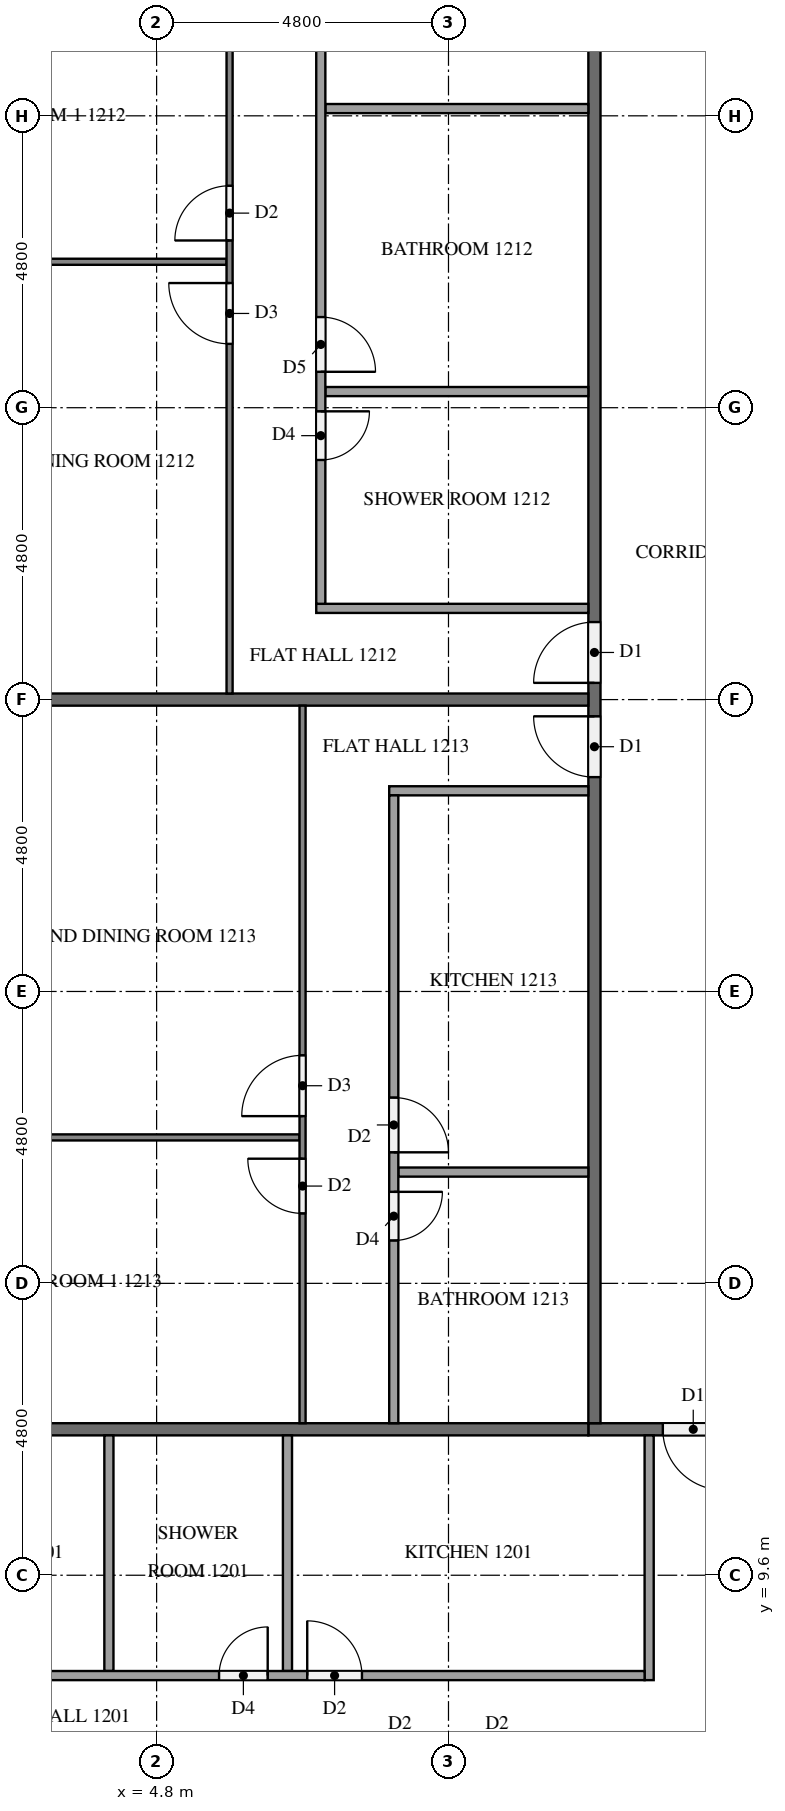
"""IFC4 building model, lengths in metres.
Left out: names, types, materials, properties, quantities, classifications, styles, units other than length and angle.
Written with IfcOpenShell. Run it as: python <this file> out.ifc"""

import sys

from ifc_helpers import new_model, si_unit, direction, frame, frame_2d, origin, place, context, subcontext, project, spatial, rectangle, extrude, element, fill, save


model = new_model("IFC4")
c1 = context("Model", 3, precision=1e-05, world=origin(), true_north=direction((0.0, 1.0)))
c2 = subcontext(c1, "Body", "Model", "MODEL_VIEW")
j1 = project(units=[si_unit("LENGTHUNIT", "METRE"), si_unit("PLANEANGLEUNIT", "RADIAN")], contexts=[c1])
p1 = place(None, origin())
s1 = spatial("IfcSite", under=j1, at=p1, CompositionType="ELEMENT")
p2 = place(p1, origin())
s2 = spatial("IfcBuilding", under=s1, at=p2, CompositionType="ELEMENT")
p3 = place(p2, frame((0.0, 0.0, 50.4)))
s3 = spatial("IfcBuildingStorey", under=s2, at=p3, CompositionType="ELEMENT", Elevation=50.4)
p4 = place(p3, frame((50.5, 12.0, 0.0), z_axis=(0.0, 0.0, 1.0), x_axis=(-1.0, 0.0, 0.0)))
e1 = element("IfcWall", 1, at=p4, inside=s3, PredefinedType="PARTITIONING", context=c2, shape_type="SweptSolid", body=[
    extrude(rectangle(XDim=38.6, YDim=0.2, at=frame_2d((19.3, 0.0))), origin(), (0.0, 0.0, 1.0), 3.1),
])
p5 = place(p4, frame((36.375, 0.0, 0.0)))
e2 = element("IfcOpeningElement", 2, at=p5, cuts=e1, PredefinedType="OPENING", context=c2, shape_type="SweptSolid", body=[
    extrude(rectangle(XDim=1.0, YDim=2.1, at=frame_2d((0.5, 1.05))), frame((0.0, 0.11, 0.0), z_axis=(0.0, -1.0, 0.0), x_axis=(1.0, 0.0, 0.0)), (0.0, 0.0, 1.0), 0.22),
])
p6 = place(p4, frame((19.575, 0.0, 0.0)))
e3 = element("IfcOpeningElement", 3, at=p6, cuts=e1, PredefinedType="OPENING", context=c2, shape_type="SweptSolid", body=[
    extrude(rectangle(XDim=1.0, YDim=2.1, at=frame_2d((0.5, 1.05))), frame((0.0, 0.11, 0.0), z_axis=(0.0, -1.0, 0.0), x_axis=(1.0, 0.0, 0.0)), (0.0, 0.0, 1.0), 0.22),
])
p7 = place(p4, frame((7.575, 0.0, 0.0)))
e4 = element("IfcOpeningElement", 4, at=p7, cuts=e1, PredefinedType="OPENING", context=c2, shape_type="SweptSolid", body=[
    extrude(rectangle(XDim=1.0, YDim=2.1, at=frame_2d((0.5, 1.05))), frame((0.0, 0.11, 0.0), z_axis=(0.0, -1.0, 0.0), x_axis=(1.0, 0.0, 0.0)), (0.0, 0.0, 1.0), 0.22),
])
p8 = place(p4, frame((0.375, 0.0, 0.0)))
e5 = element("IfcOpeningElement", 5, at=p8, cuts=e1, PredefinedType="OPENING", context=c2, shape_type="SweptSolid", body=[
    extrude(rectangle(XDim=1.0, YDim=2.1, at=frame_2d((0.5, 1.05))), frame((0.0, 0.11, 0.0), z_axis=(0.0, -1.0, 0.0), x_axis=(1.0, 0.0, 0.0)), (0.0, 0.0, 1.0), 0.22),
])
p9 = place(p3, frame((12.0, 12.1, 0.0), z_axis=(0.0, 0.0, 1.0), x_axis=(0.0, 1.0, 0.0)))
e6 = element("IfcWall", 6, at=p9, inside=s3, PredefinedType="PARTITIONING", context=c2, shape_type="SweptSolid", body=[
    extrude(rectangle(XDim=28.6, YDim=0.2, at=frame_2d((14.3, 0.0))), origin(), (0.0, 0.0, 1.0), 3.1),
])
p10 = place(p9, frame((12.175, 0.0, 0.0)))
e7 = element("IfcOpeningElement", 7, at=p10, cuts=e6, PredefinedType="OPENING", context=c2, shape_type="SweptSolid", body=[
    extrude(rectangle(XDim=1.0, YDim=2.1, at=frame_2d((0.5, 1.05))), frame((0.0, 0.11, 0.0), z_axis=(0.0, -1.0, 0.0), x_axis=(1.0, 0.0, 0.0)), (0.0, 0.0, 1.0), 0.22),
])
p11 = place(p9, frame((10.625, 0.0, 0.0)))
e8 = element("IfcOpeningElement", 8, at=p11, cuts=e6, PredefinedType="OPENING", context=c2, shape_type="SweptSolid", body=[
    extrude(rectangle(XDim=1.0, YDim=2.1, at=frame_2d((0.5, 1.05))), frame((0.0, 0.11, 0.0), z_axis=(0.0, -1.0, 0.0), x_axis=(1.0, 0.0, 0.0)), (0.0, 0.0, 1.0), 0.22),
])
p12 = place(p3, frame((0.1, 12.0, 0.0), z_axis=(0.0, 0.0, 1.0), x_axis=(1.0, 0.0, 0.0)))
e9 = element("IfcWall", 9, at=p12, inside=s3, PredefinedType="PARTITIONING", context=c2, shape_type="SweptSolid", body=[
    extrude(rectangle(XDim=11.8, YDim=0.2, at=frame_2d((5.9, 0.0))), origin(), (0.0, 0.0, 1.0), 3.1),
])
p13 = place(p3, frame((0.45, 24.0, 0.0), z_axis=(0.0, 0.0, 1.0), x_axis=(1.0, 0.0, 0.0)))
e10 = element("IfcWall", 10, at=p13, inside=s3, PredefinedType="PARTITIONING", context=c2, shape_type="SweptSolid", body=[
    extrude(rectangle(XDim=11.45, YDim=0.2, at=frame_2d((5.725, 0.0))), origin(), (0.0, 0.0, 1.0), 3.1),
])
for number, where, z_axis, x_axis in (
    (11, (6.952, 11.9, 0.0), (0.0, 0.0, 1.0), (0.0, -1.0, 0.0)),
    (12, (4.015, 11.9, 0.0), (0.0, 0.0, 1.0), (0.0, -1.0, 0.0)),
):
    element("IfcWall", number, at=place(p3, frame(where, z_axis=z_axis, x_axis=x_axis)), inside=s3, PredefinedType="PARTITIONING", context=c2, shape_type="SweptSolid", body=[
        extrude(rectangle(XDim=3.875, YDim=0.15, at=frame_2d((1.938, 0.0))), origin(), (0.0, 0.0, 1.0), 3.1),
    ])
p14 = place(p3, frame((12.9, 11.9, 0.0), z_axis=(0.0, 0.0, 1.0), x_axis=(0.0, -1.0, 0.0)))
e13 = element("IfcWall", 13, at=p14, inside=s3, PredefinedType="PARTITIONING", context=c2, shape_type="SweptSolid", body=[
    extrude(rectangle(XDim=4.025, YDim=0.15, at=frame_2d((2.012, 0.0))), origin(), (0.0, 0.0, 1.0), 3.1),
])
p15 = place(p3, frame((0.1, 7.95, 0.0), z_axis=(0.0, 0.0, 1.0), x_axis=(1.0, 0.0, 0.0)))
e14 = element("IfcWall", 14, at=p15, inside=s3, PredefinedType="PARTITIONING", context=c2, shape_type="SweptSolid", body=[
    extrude(rectangle(XDim=12.725, YDim=0.15, at=frame_2d((6.362, 0.0))), origin(), (0.0, 0.0, 1.0), 3.1),
])
p16 = place(p15, frame((7.177, 0.0, 0.0)))
e15 = element("IfcOpeningElement", 15, at=p16, cuts=e14, PredefinedType="OPENING", context=c2, shape_type="SweptSolid", body=[
    extrude(rectangle(XDim=0.9, YDim=2.1, at=frame_2d((0.45, 1.05))), frame((0.0, 0.085, 0.0), z_axis=(0.0, -1.0, 0.0), x_axis=(1.0, 0.0, 0.0)), (0.0, 0.0, 1.0), 0.17),
])
p17 = place(p15, frame((5.727, 0.0, 0.0)))
e16 = element("IfcOpeningElement", 16, at=p17, cuts=e14, PredefinedType="OPENING", context=c2, shape_type="SweptSolid", body=[
    extrude(rectangle(XDim=0.8, YDim=2.1, at=frame_2d((0.4, 1.05))), frame((0.0, 0.085, 0.0), z_axis=(0.0, -1.0, 0.0), x_axis=(1.0, 0.0, 0.0)), (0.0, 0.0, 1.0), 0.17),
])
p18 = place(p15, frame((0.35, 0.0, 0.0)))
e17 = element("IfcOpeningElement", 17, at=p18, cuts=e14, PredefinedType="OPENING", context=c2, shape_type="SweptSolid", body=[
    extrude(rectangle(XDim=0.9, YDim=2.1, at=frame_2d((0.45, 1.05))), frame((0.0, 0.085, 0.0), z_axis=(0.0, -1.0, 0.0), x_axis=(1.0, 0.0, 0.0)), (0.0, 0.0, 1.0), 0.17),
])
p19 = place(p3, frame((5.95, 31.2, 0.0), z_axis=(0.0, 0.0, 1.0), x_axis=(-1.0, 0.0, 0.0)))
e18 = element("IfcWall", 18, at=p19, inside=s3, PredefinedType="PARTITIONING", context=c2, shape_type="SweptSolid", body=[
    extrude(rectangle(XDim=5.85, YDim=0.1, at=frame_2d((2.925, 0.0))), origin(), (0.0, 0.0, 1.0), 3.1),
])
p20 = place(p3, frame((6.0, 24.1, 0.0), z_axis=(0.0, 0.0, 1.0), x_axis=(0.0, 1.0, 0.0)))
e19 = element("IfcWall", 19, at=p20, inside=s3, PredefinedType="PARTITIONING", context=c2, shape_type="SweptSolid", body=[
    extrude(rectangle(XDim=16.6, YDim=0.1, at=frame_2d((8.3, 0.0))), origin(), (0.0, 0.0, 1.0), 3.1),
])
p21 = place(p20, frame((5.75, 0.0, 0.0)))
e20 = element("IfcOpeningElement", 20, at=p21, cuts=e19, PredefinedType="OPENING", context=c2, shape_type="SweptSolid", body=[
    extrude(rectangle(XDim=1.0, YDim=2.1, at=frame_2d((0.5, 1.05))), frame((0.0, 0.06, 0.0), z_axis=(0.0, -1.0, 0.0), x_axis=(1.0, 0.0, 0.0)), (0.0, 0.0, 1.0), 0.12),
])
p22 = place(p20, frame((7.45, 0.0, 0.0)))
e21 = element("IfcOpeningElement", 21, at=p22, cuts=e19, PredefinedType="OPENING", context=c2, shape_type="SweptSolid", body=[
    extrude(rectangle(XDim=0.9, YDim=2.1, at=frame_2d((0.45, 1.05))), frame((0.0, 0.06, 0.0), z_axis=(0.0, -1.0, 0.0), x_axis=(1.0, 0.0, 0.0)), (0.0, 0.0, 1.0), 0.12),
])
p23 = place(p20, frame((15.4, 0.0, 0.0)))
e22 = element("IfcOpeningElement", 22, at=p23, cuts=e19, PredefinedType="OPENING", context=c2, shape_type="SweptSolid", body=[
    extrude(rectangle(XDim=0.9, YDim=2.1, at=frame_2d((0.45, 1.05))), frame((0.0, 0.06, 0.0), z_axis=(0.0, -1.0, 0.0), x_axis=(1.0, 0.0, 0.0)), (0.0, 0.0, 1.0), 0.12),
])
for number, where, z_axis, x_axis in (
    (23, (11.9, 29.065, 0.0), (0.0, 0.0, 1.0), (-1.0, 0.0, 0.0)),
    (24, (11.9, 33.719, 0.0), (0.0, 0.0, 1.0), (-1.0, 0.0, 0.0)),
):
    element("IfcWall", number, at=place(p3, frame(where, z_axis=z_axis, x_axis=x_axis)), inside=s3, PredefinedType="PARTITIONING", context=c2, shape_type="SweptSolid", body=[
        extrude(rectangle(XDim=4.325, YDim=0.15, at=frame_2d((2.163, 0.0))), origin(), (0.0, 0.0, 1.0), 3.1),
    ])
p24 = place(p3, frame((11.9, 25.5, 0.0), z_axis=(0.0, 0.0, 1.0), x_axis=(-1.0, 0.0, 0.0)))
e25 = element("IfcWall", 25, at=p24, inside=s3, PredefinedType="PARTITIONING", context=c2, shape_type="SweptSolid", body=[
    extrude(rectangle(XDim=4.475, YDim=0.15, at=frame_2d((2.237, 0.0))), origin(), (0.0, 0.0, 1.0), 3.1),
])
p25 = place(p3, frame((7.5, 40.7, 0.0), z_axis=(0.0, 0.0, 1.0), x_axis=(0.0, -1.0, 0.0)))
e26 = element("IfcWall", 26, at=p25, inside=s3, PredefinedType="PARTITIONING", context=c2, shape_type="SweptSolid", body=[
    extrude(rectangle(XDim=15.125, YDim=0.15, at=frame_2d((7.562, 0.0))), origin(), (0.0, 0.0, 1.0), 3.1),
])
p26 = place(p25, frame((11.96, 0.0, 0.0)))
e27 = element("IfcOpeningElement", 27, at=p26, cuts=e26, PredefinedType="OPENING", context=c2, shape_type="SweptSolid", body=[
    extrude(rectangle(XDim=0.8, YDim=2.1, at=frame_2d((0.4, 1.05))), frame((0.0, 0.085, 0.0), z_axis=(0.0, -1.0, 0.0), x_axis=(1.0, 0.0, 0.0)), (0.0, 0.0, 1.0), 0.17),
])
p27 = place(p25, frame((10.41, 0.0, 0.0)))
e28 = element("IfcOpeningElement", 28, at=p27, cuts=e26, PredefinedType="OPENING", context=c2, shape_type="SweptSolid", body=[
    extrude(rectangle(XDim=0.9, YDim=2.1, at=frame_2d((0.45, 1.05))), frame((0.0, 0.085, 0.0), z_axis=(0.0, -1.0, 0.0), x_axis=(1.0, 0.0, 0.0)), (0.0, 0.0, 1.0), 0.17),
])
p28 = place(p25, frame((0.35, 0.0, 0.0)))
e29 = element("IfcOpeningElement", 29, at=p28, cuts=e26, PredefinedType="OPENING", context=c2, shape_type="SweptSolid", body=[
    extrude(rectangle(XDim=0.9, YDim=2.1, at=frame_2d((0.45, 1.05))), frame((0.0, 0.085, 0.0), z_axis=(0.0, -1.0, 0.0), x_axis=(1.0, 0.0, 0.0)), (0.0, 0.0, 1.0), 0.17),
])
p29 = place(p3, frame((7.15, 16.8, 0.0), z_axis=(0.0, 0.0, 1.0), x_axis=(-1.0, 0.0, 0.0)))
e30 = element("IfcWall", 30, at=p29, inside=s3, PredefinedType="PARTITIONING", context=c2, shape_type="SweptSolid", body=[
    extrude(rectangle(XDim=7.05, YDim=0.1, at=frame_2d((3.525, 0.0))), origin(), (0.0, 0.0, 1.0), 3.1),
])
p30 = place(p3, frame((7.2, 12.1, 0.0), z_axis=(0.0, 0.0, 1.0), x_axis=(0.0, 1.0, 0.0)))
e31 = element("IfcWall", 31, at=p30, inside=s3, PredefinedType="PARTITIONING", context=c2, shape_type="SweptSolid", body=[
    extrude(rectangle(XDim=11.8, YDim=0.1, at=frame_2d((5.9, 0.0))), origin(), (0.0, 0.0, 1.0), 3.1),
])
p31 = place(p30, frame((5.05, 0.0, 0.0)))
e32 = element("IfcOpeningElement", 32, at=p31, cuts=e31, PredefinedType="OPENING", context=c2, shape_type="SweptSolid", body=[
    extrude(rectangle(XDim=1.0, YDim=2.1, at=frame_2d((0.5, 1.05))), frame((0.0, 0.06, 0.0), z_axis=(0.0, -1.0, 0.0), x_axis=(1.0, 0.0, 0.0)), (0.0, 0.0, 1.0), 0.12),
])
p32 = place(p30, frame((3.45, 0.0, 0.0)))
e33 = element("IfcOpeningElement", 33, at=p32, cuts=e31, PredefinedType="OPENING", context=c2, shape_type="SweptSolid", body=[
    extrude(rectangle(XDim=0.9, YDim=2.1, at=frame_2d((0.45, 1.05))), frame((0.0, 0.06, 0.0), z_axis=(0.0, -1.0, 0.0), x_axis=(1.0, 0.0, 0.0)), (0.0, 0.0, 1.0), 0.12),
])
p33 = place(p3, frame((11.9, 16.23, 0.0), z_axis=(0.0, 0.0, 1.0), x_axis=(-1.0, 0.0, 0.0)))
e34 = element("IfcWall", 34, at=p33, inside=s3, PredefinedType="PARTITIONING", context=c2, shape_type="SweptSolid", body=[
    extrude(rectangle(XDim=3.125, YDim=0.15, at=frame_2d((1.562, 0.0))), origin(), (0.0, 0.0, 1.0), 3.1),
])
p34 = place(p3, frame((11.9, 22.5, 0.0), z_axis=(0.0, 0.0, 1.0), x_axis=(-1.0, 0.0, 0.0)))
e35 = element("IfcWall", 35, at=p34, inside=s3, PredefinedType="PARTITIONING", context=c2, shape_type="SweptSolid", body=[
    extrude(rectangle(XDim=3.275, YDim=0.15, at=frame_2d((1.637, 0.0))), origin(), (0.0, 0.0, 1.0), 3.1),
])
p35 = place(p3, frame((8.7, 22.425, 0.0), z_axis=(0.0, 0.0, 1.0), x_axis=(0.0, -1.0, 0.0)))
e36 = element("IfcWall", 36, at=p35, inside=s3, PredefinedType="PARTITIONING", context=c2, shape_type="SweptSolid", body=[
    extrude(rectangle(XDim=10.325, YDim=0.15, at=frame_2d((5.163, 0.0))), origin(), (0.0, 0.0, 1.0), 3.1),
])
p36 = place(p35, frame((4.97, 0.0, 0.0)))
e37 = element("IfcOpeningElement", 37, at=p36, cuts=e36, PredefinedType="OPENING", context=c2, shape_type="SweptSolid", body=[
    extrude(rectangle(XDim=0.9, YDim=2.1, at=frame_2d((0.45, 1.05))), frame((0.0, 0.085, 0.0), z_axis=(0.0, -1.0, 0.0), x_axis=(1.0, 0.0, 0.0)), (0.0, 0.0, 1.0), 0.17),
])
p37 = place(p35, frame((6.52, 0.0, 0.0)))
e38 = element("IfcOpeningElement", 38, at=p37, cuts=e36, PredefinedType="OPENING", context=c2, shape_type="SweptSolid", body=[
    extrude(rectangle(XDim=0.8, YDim=2.1, at=frame_2d((0.4, 1.05))), frame((0.0, 0.085, 0.0), z_axis=(0.0, -1.0, 0.0), x_axis=(1.0, 0.0, 0.0)), (0.0, 0.0, 1.0), 0.17),
])
p38 = place(p5, origin())
e39 = element("IfcDoor", 39, at=p38, inside=s3, OperationType="SINGLE_SWING_LEFT", PredefinedType="DOOR", context=c2, shape_type="SweptSolid", body=[
    extrude(rectangle(XDim=1.0, YDim=2.1, at=frame_2d((0.5, 1.05))), frame((0.0, 0.025, 0.0), z_axis=(0.0, -1.0, 0.0), x_axis=(1.0, 0.0, 0.0)), (0.0, 0.0, 1.0), 0.05),
])
fill(e2, e39)
p39 = place(p10, origin())
e40 = element("IfcDoor", 40, at=p39, inside=s3, OperationType="SINGLE_SWING_LEFT", PredefinedType="DOOR", context=c2, shape_type="SweptSolid", body=[
    extrude(rectangle(XDim=1.0, YDim=2.1, at=frame_2d((0.5, 1.05))), frame((0.0, 0.025, 0.0), z_axis=(0.0, -1.0, 0.0), x_axis=(1.0, 0.0, 0.0)), (0.0, 0.0, 1.0), 0.05),
])
fill(e7, e40)
p40 = place(p11, origin())
e41 = element("IfcDoor", 41, at=p40, inside=s3, OperationType="SINGLE_SWING_RIGHT", PredefinedType="DOOR", context=c2, shape_type="SweptSolid", body=[
    extrude(rectangle(XDim=1.0, YDim=2.1, at=frame_2d((0.5, 1.05))), frame((0.0, 0.025, 0.0), z_axis=(0.0, -1.0, 0.0), x_axis=(1.0, 0.0, 0.0)), (0.0, 0.0, 1.0), 0.05),
])
fill(e8, e41)
p41 = place(p16, origin())
e42 = element("IfcDoor", 42, at=p41, inside=s3, OperationType="SINGLE_SWING_LEFT", PredefinedType="DOOR", context=c2, shape_type="SweptSolid", body=[
    extrude(rectangle(XDim=0.9, YDim=2.1, at=frame_2d((0.45, 1.05))), frame((0.0, 0.025, 0.0), z_axis=(0.0, -1.0, 0.0), x_axis=(1.0, 0.0, 0.0)), (0.0, 0.0, 1.0), 0.05),
])
fill(e15, e42)
p42 = place(p17, origin())
e43 = element("IfcDoor", 43, at=p42, inside=s3, OperationType="SINGLE_SWING_RIGHT", PredefinedType="DOOR", context=c2, shape_type="SweptSolid", body=[
    extrude(rectangle(XDim=0.8, YDim=2.1, at=frame_2d((0.4, 1.05))), frame((0.0, 0.025, 0.0), z_axis=(0.0, -1.0, 0.0), x_axis=(1.0, 0.0, 0.0)), (0.0, 0.0, 1.0), 0.05),
])
fill(e16, e43)
p43 = place(p21, origin())
e44 = element("IfcDoor", 44, at=p43, inside=s3, OperationType="SINGLE_SWING_RIGHT", PredefinedType="DOOR", context=c2, shape_type="SweptSolid", body=[
    extrude(rectangle(XDim=1.0, YDim=2.1, at=frame_2d((0.5, 1.05))), frame((0.0, 0.025, 0.0), z_axis=(0.0, -1.0, 0.0), x_axis=(1.0, 0.0, 0.0)), (0.0, 0.0, 1.0), 0.05),
])
fill(e20, e44)
p44 = place(p22, origin())
e45 = element("IfcDoor", 45, at=p44, inside=s3, OperationType="SINGLE_SWING_LEFT", PredefinedType="DOOR", context=c2, shape_type="SweptSolid", body=[
    extrude(rectangle(XDim=0.9, YDim=2.1, at=frame_2d((0.45, 1.05))), frame((0.0, 0.025, 0.0), z_axis=(0.0, -1.0, 0.0), x_axis=(1.0, 0.0, 0.0)), (0.0, 0.0, 1.0), 0.05),
])
fill(e21, e45)
p45 = place(p26, origin())
e46 = element("IfcDoor", 46, at=p45, inside=s3, OperationType="SINGLE_SWING_LEFT", PredefinedType="DOOR", context=c2, shape_type="SweptSolid", body=[
    extrude(rectangle(XDim=0.8, YDim=2.1, at=frame_2d((0.4, 1.05))), frame((0.0, 0.025, 0.0), z_axis=(0.0, -1.0, 0.0), x_axis=(1.0, 0.0, 0.0)), (0.0, 0.0, 1.0), 0.05),
])
fill(e27, e46)
p46 = place(p27, origin())
e47 = element("IfcDoor", 47, at=p46, inside=s3, OperationType="SINGLE_SWING_RIGHT", PredefinedType="DOOR", context=c2, shape_type="SweptSolid", body=[
    extrude(rectangle(XDim=0.9, YDim=2.1, at=frame_2d((0.45, 1.05))), frame((0.0, 0.025, 0.0), z_axis=(0.0, -1.0, 0.0), x_axis=(1.0, 0.0, 0.0)), (0.0, 0.0, 1.0), 0.05),
])
fill(e28, e47)
p47 = place(p31, origin())
e48 = element("IfcDoor", 48, at=p47, inside=s3, OperationType="SINGLE_SWING_LEFT", PredefinedType="DOOR", context=c2, shape_type="SweptSolid", body=[
    extrude(rectangle(XDim=1.0, YDim=2.1, at=frame_2d((0.5, 1.05))), frame((0.0, 0.025, 0.0), z_axis=(0.0, -1.0, 0.0), x_axis=(1.0, 0.0, 0.0)), (0.0, 0.0, 1.0), 0.05),
])
fill(e32, e48)
p48 = place(p32, origin())
e49 = element("IfcDoor", 49, at=p48, inside=s3, OperationType="SINGLE_SWING_RIGHT", PredefinedType="DOOR", context=c2, shape_type="SweptSolid", body=[
    extrude(rectangle(XDim=0.9, YDim=2.1, at=frame_2d((0.45, 1.05))), frame((0.0, 0.025, 0.0), z_axis=(0.0, -1.0, 0.0), x_axis=(1.0, 0.0, 0.0)), (0.0, 0.0, 1.0), 0.05),
])
fill(e33, e49)
p49 = place(p36, origin())
e50 = element("IfcDoor", 50, at=p49, inside=s3, OperationType="SINGLE_SWING_RIGHT", PredefinedType="DOOR", context=c2, shape_type="SweptSolid", body=[
    extrude(rectangle(XDim=0.9, YDim=2.1, at=frame_2d((0.45, 1.05))), frame((0.0, 0.025, 0.0), z_axis=(0.0, -1.0, 0.0), x_axis=(1.0, 0.0, 0.0)), (0.0, 0.0, 1.0), 0.05),
])
fill(e37, e50)
p50 = place(p37, origin())
e51 = element("IfcDoor", 51, at=p50, inside=s3, OperationType="SINGLE_SWING_LEFT", PredefinedType="DOOR", context=c2, shape_type="SweptSolid", body=[
    extrude(rectangle(XDim=0.8, YDim=2.1, at=frame_2d((0.4, 1.05))), frame((0.0, 0.025, 0.0), z_axis=(0.0, -1.0, 0.0), x_axis=(1.0, 0.0, 0.0)), (0.0, 0.0, 1.0), 0.05),
])
fill(e38, e51)
save(model, sys.argv[1])
